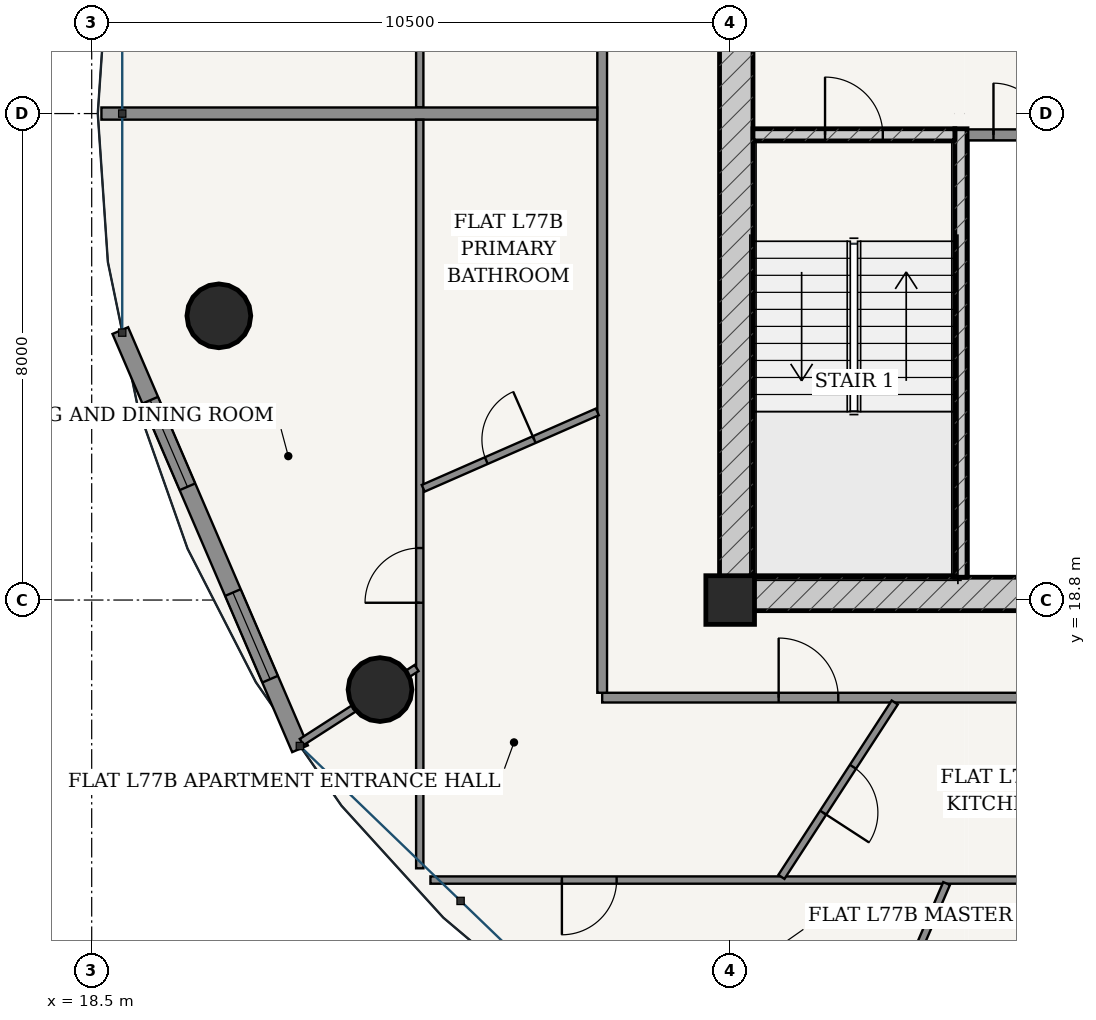
"""IFC4 building model, lengths in metres.
Left out: names, types, materials, properties, quantities, classifications, styles, units other than length and angle.
Written with IfcOpenShell. Run it as: python <this file> out.ifc"""

import sys

from ifc_helpers import new_model, si_unit, direction, frame, frame_2d, origin, origin_2d, place, context, subcontext, project, spatial, rectangle, hollow_circle, extrude, source, transform, mapped, element, fill, save


model = new_model("IFC4")
c1 = context("Model", 3, precision=1e-05, world=origin(), true_north=direction((-0.2419218956, 0.970295726276)))
c2 = subcontext(c1, "Body", "Model", "MODEL_VIEW")
j1 = project(units=[si_unit("LENGTHUNIT", "METRE"), si_unit("PLANEANGLEUNIT", "RADIAN")], contexts=[c1])
p1 = place(None, origin())
s1 = spatial("IfcSite", under=j1, at=p1, CompositionType="ELEMENT")
p2 = place(p1, origin())
s2 = spatial("IfcBuilding", under=s1, at=p2, CompositionType="ELEMENT")
p3 = place(p2, frame((0.0, 0.0, 293.2)))
s3 = spatial("IfcBuildingStorey", under=s2, at=p3, CompositionType="ELEMENT", Elevation=293.2)
p4 = place(p3, frame((29.0, 18.8, 0.0), z_axis=(0.0, 0.0, 1.0), x_axis=(1.0, 0.0, 0.0)))
e1 = element("IfcColumn", 1, at=p4, inside=s3, PredefinedType="COLUMN", context=c2, shape_type="SweptSolid", body=[
    extrude(rectangle(XDim=0.8, YDim=0.8, at=origin_2d()), origin(), (0.0, 0.0, 1.0), 3.75),
])
p5 = place(p3, frame((28.825, 18.9, 0.0), z_axis=(0.0, 0.0, 1.0), x_axis=(1.0, 0.0, 0.0)))
e2 = element("IfcWall", 2, at=p5, inside=s3, PredefinedType="SHEAR", context=c2, shape_type="SweptSolid", body=[
    extrude(rectangle(XDim=18.35, YDim=0.55, at=frame_2d((9.175, 0.0))), origin(), (0.0, 0.0, 1.0), 3.49),
])
p6 = place(p5, frame((8.75, 0.0, 0.0)))
e3 = element("IfcOpeningElement", 3, at=p6, cuts=e2, PredefinedType="OPENING", context=c2, shape_type="SweptSolid", body=[
    extrude(rectangle(XDim=0.85, YDim=2.1, at=frame_2d((0.425, 1.05))), frame((0.0, 0.285, 0.0), z_axis=(0.0, -1.0, 0.0), x_axis=(1.0, 0.0, 0.0)), (0.0, 0.0, 1.0), 0.57),
])
p7 = place(p3, frame((29.1, 19.175, 0.0), z_axis=(0.0, 0.0, 1.0), x_axis=(0.0, 1.0, 0.0)))
e4 = element("IfcWall", 4, at=p7, inside=s3, PredefinedType="SHEAR", context=c2, shape_type="SweptSolid", body=[
    extrude(rectangle(XDim=15.25, YDim=0.55, at=frame_2d((7.625, 0.0))), origin(), (0.0, 0.0, 1.0), 3.49),
])
p8 = place(p7, frame((9.875, 0.0, 0.0)))
e5 = element("IfcOpeningElement", 5, at=p8, cuts=e4, PredefinedType="OPENING", context=c2, shape_type="SweptSolid", body=[
    extrude(rectangle(XDim=1.5, YDim=2.2, at=frame_2d((0.75, 1.1))), frame((0.0, 0.285, 0.0), z_axis=(0.0, -1.0, 0.0), x_axis=(1.0, 0.0, 0.0)), (0.0, 0.0, 1.0), 0.57),
])
p9 = place(p3, frame((32.795, 19.175, 0.0), z_axis=(0.0, 0.0, 1.0), x_axis=(0.0, 1.0, 0.0)))
e6 = element("IfcWall", 6, at=p9, inside=s3, PredefinedType="SOLIDWALL", context=c2, shape_type="SweptSolid", body=[
    extrude(rectangle(XDim=7.375, YDim=0.2, at=frame_2d((3.688, 0.0))), origin(), (0.0, 0.0, 1.0), 3.49),
])
p10 = place(p3, frame((29.375, 26.45, 0.0), z_axis=(0.0, 0.0, 1.0), x_axis=(1.0, 0.0, 0.0)))
e7 = element("IfcWall", 7, at=p10, inside=s3, PredefinedType="SOLIDWALL", context=c2, shape_type="SweptSolid", body=[
    extrude(rectangle(XDim=3.32, YDim=0.2, at=frame_2d((1.66, 0.0))), origin(), (0.0, 0.0, 1.0), 3.49),
])
p11 = place(p10, frame((1.185, 0.0, 0.0)))
e8 = element("IfcOpeningElement", 8, at=p11, cuts=e7, PredefinedType="OPENING", context=c2, shape_type="SweptSolid", body=[
    extrude(rectangle(XDim=0.95, YDim=2.15, at=frame_2d((0.475, 1.075))), frame((0.0, 0.11, 0.0), z_axis=(0.0, -1.0, 0.0), x_axis=(1.0, 0.0, 0.0)), (0.0, 0.0, 1.0), 0.22),
])
for number, where, z_axis, x_axis in (
    (9, (20.591, 23.474, 0.0), (0.0, 0.0, 1.0), (1.0, 0.0, 0.0)),
    (10, (23.241, 17.328, 0.0), (0.0, 0.0, 1.0), (1.0, 0.0, 0.0)),
):
    element("IfcColumn", number, at=place(p3, frame(where, z_axis=z_axis, x_axis=x_axis)), inside=s3, PredefinedType="COLUMN", context=c2, shape_type="SweptSolid", body=[
        extrude(hollow_circle(Radius=0.525, WallThickness=0.035, at=origin_2d()), origin(), (0.0, 0.0, 1.0), 3.75),
    ])
p12 = place(p3, frame((18.971, 23.231, 0.0), z_axis=(0.0, 0.0, 1.0), x_axis=(0.394816612978, -0.918759948037, 0.0)))
e11 = element("IfcWall", 11, at=p12, inside=s3, PredefinedType="SOLIDWALL", context=c2, shape_type="SweptSolid", body=[
    extrude(rectangle(XDim=7.485, YDim=0.28, at=frame_2d((3.743, 0.0))), origin(), (0.0, 0.0, 1.0), 3.49),
])
p13 = place(p12, frame((1.246, 0.0, 0.85)))
e12 = element("IfcOpeningElement", 12, at=p13, cuts=e11, PredefinedType="OPENING", context=c2, shape_type="SweptSolid", body=[
    extrude(rectangle(XDim=1.55, YDim=1.95, at=frame_2d((0.775, 0.975))), frame((0.0, 0.15, 0.0), z_axis=(0.0, -1.0, 0.0), x_axis=(1.0, 0.0, 0.0)), (0.0, 0.0, 1.0), 0.3),
])
p14 = place(p12, frame((4.689, 0.0, 0.85)))
e13 = element("IfcOpeningElement", 13, at=p14, cuts=e11, PredefinedType="OPENING", context=c2, shape_type="SweptSolid", body=[
    extrude(rectangle(XDim=1.55, YDim=1.95, at=frame_2d((0.775, 0.975))), frame((0.0, 0.15, 0.0), z_axis=(0.0, -1.0, 0.0), x_axis=(1.0, 0.0, 0.0)), (0.0, 0.0, 1.0), 0.3),
])
p15 = place(p3, frame((32.9, 26.45, 0.0), z_axis=(0.0, 0.0, 1.0), x_axis=(1.0, 0.0, 0.0)))
e14 = element("IfcWall", 14, at=p15, inside=s3, PredefinedType="PARTITIONING", context=c2, shape_type="SweptSolid", body=[
    extrude(rectangle(XDim=1.71, YDim=0.18, at=frame_2d((0.855, 0.0))), origin(), (0.0, 0.0, 1.0), 3.49),
])
p16 = place(p15, frame((0.43, 0.0, 0.0)))
e15 = element("IfcOpeningElement", 15, at=p16, cuts=e14, PredefinedType="OPENING", context=c2, shape_type="SweptSolid", body=[
    extrude(rectangle(XDim=0.85, YDim=2.1, at=frame_2d((0.425, 1.05))), frame((0.0, 0.1, 0.0), z_axis=(0.0, -1.0, 0.0), x_axis=(1.0, 0.0, 0.0)), (0.0, 0.0, 1.0), 0.2),
])
p17 = place(p3, frame((26.895, 17.195, 0.0), z_axis=(0.0, 0.0, 1.0), x_axis=(1.0, 0.0, 0.0)))
e16 = element("IfcWall", 16, at=p17, inside=s3, PredefinedType="PARTITIONING", context=c2, shape_type="SweptSolid", body=[
    extrude(rectangle(XDim=22.21, YDim=0.16, at=frame_2d((11.105, 0.0))), origin(), (0.0, 0.0, 1.0), 3.015),
])
p18 = place(p17, frame((2.902, 0.0, 0.0)))
e17 = element("IfcOpeningElement", 17, at=p18, cuts=e16, PredefinedType="OPENING", context=c2, shape_type="SweptSolid", body=[
    extrude(rectangle(XDim=0.98, YDim=2.2, at=frame_2d((0.49, 1.1))), frame((0.0, 0.09, 0.0), z_axis=(0.0, -1.0, 0.0), x_axis=(1.0, 0.0, 0.0)), (0.0, 0.0, 1.0), 0.18),
])
p19 = place(p3, frame((26.895, 17.275, 0.0), z_axis=(0.0, 0.0, 1.0), x_axis=(0.0, 1.0, 0.0)))
e18 = element("IfcWall", 18, at=p19, inside=s3, PredefinedType="PARTITIONING", context=c2, shape_type="SweptSolid", body=[
    extrude(rectangle(XDim=13.925, YDim=0.16, at=frame_2d((6.962, 0.0))), origin(), (0.0, 0.0, 1.0), 3.015),
])
p20 = place(p3, frame((23.895, 26.902, 0.0), z_axis=(0.0, 0.0, 1.0), x_axis=(0.0, 1.0, 0.0)))
e19 = element("IfcWall", 19, at=p20, inside=s3, PredefinedType="PARTITIONING", context=c2, shape_type="SweptSolid", body=[
    extrude(rectangle(XDim=7.378, YDim=0.12, at=frame_2d((3.689, 0.0))), origin(), (0.0, 0.0, 1.0), 3.015),
])
p21 = place(p20, frame((3.239, 0.0, 0.0)))
e20 = element("IfcOpeningElement", 20, at=p21, cuts=e19, PredefinedType="OPENING", context=c2, shape_type="SweptSolid", body=[
    extrude(rectangle(XDim=0.9, YDim=2.15, at=frame_2d((0.45, 1.075))), frame((0.0, 0.07, 0.0), z_axis=(0.0, -1.0, 0.0), x_axis=(1.0, 0.0, 0.0)), (0.0, 0.0, 1.0), 0.14),
])
p22 = place(p3, frame((26.815, 26.8, 0.0), z_axis=(0.0, 0.0, 1.0), x_axis=(-1.0, 0.0, 0.0)))
e21 = element("IfcWall", 21, at=p22, inside=s3, PredefinedType="PARTITIONING", context=c2, shape_type="SweptSolid", body=[
    extrude(rectangle(XDim=8.155, YDim=0.2, at=frame_2d((4.078, 0.0))), origin(), (0.0, 0.0, 1.0), 3.121),
])
p23 = place(p3, frame((51.929, 14.195, 0.0), z_axis=(0.0, 0.0, 1.0), x_axis=(-1.0, 0.0, 0.0)))
e22 = element("IfcWall", 22, at=p23, inside=s3, PredefinedType="PARTITIONING", context=c2, shape_type="SweptSolid", body=[
    extrude(rectangle(XDim=27.858, YDim=0.12, at=frame_2d((13.929, 0.0))), origin(), (0.0, 0.0, 1.0), 3.015),
])
p24 = place(p23, frame((24.797, 0.0, 0.0)))
e23 = element("IfcOpeningElement", 23, at=p24, cuts=e22, PredefinedType="OPENING", context=c2, shape_type="SweptSolid", body=[
    extrude(rectangle(XDim=0.9, YDim=2.15, at=frame_2d((0.45, 1.075))), frame((0.0, 0.07, 0.0), z_axis=(0.0, -1.0, 0.0), x_axis=(1.0, 0.0, 0.0)), (0.0, 0.0, 1.0), 0.14),
])
p25 = place(p23, frame((11.968, 0.0, 0.0)))
e24 = element("IfcOpeningElement", 24, at=p25, cuts=e22, PredefinedType="OPENING", context=c2, shape_type="SweptSolid", body=[
    extrude(rectangle(XDim=0.9, YDim=2.15, at=frame_2d((0.45, 1.075))), frame((0.0, 0.07, 0.0), z_axis=(0.0, -1.0, 0.0), x_axis=(1.0, 0.0, 0.0)), (0.0, 0.0, 1.0), 0.14),
])
p26 = place(p23, frame((5.092, 0.0, 0.0)))
e25 = element("IfcOpeningElement", 25, at=p26, cuts=e22, PredefinedType="OPENING", context=c2, shape_type="SweptSolid", body=[
    extrude(rectangle(XDim=0.9, YDim=2.15, at=frame_2d((0.45, 1.075))), frame((0.0, 0.07, 0.0), z_axis=(0.0, -1.0, 0.0), x_axis=(1.0, 0.0, 0.0)), (0.0, 0.0, 1.0), 0.14),
])
p27 = place(p3, frame((23.895, 14.388, 0.0), z_axis=(0.0, 0.0, 1.0), x_axis=(0.0, 1.0, 0.0)))
e26 = element("IfcWall", 26, at=p27, inside=s3, PredefinedType="PARTITIONING", context=c2, shape_type="SweptSolid", body=[
    extrude(rectangle(XDim=12.31, YDim=0.12, at=frame_2d((6.155, 0.0))), origin(), (0.0, 0.0, 1.0), 3.015),
])
p28 = place(p27, frame((4.367, 0.0, 0.0)))
e27 = element("IfcOpeningElement", 27, at=p28, cuts=e26, PredefinedType="OPENING", context=c2, shape_type="SweptSolid", body=[
    extrude(rectangle(XDim=0.9, YDim=2.15, at=frame_2d((0.45, 1.075))), frame((0.0, 0.07, 0.0), z_axis=(0.0, -1.0, 0.0), x_axis=(1.0, 0.0, 0.0)), (0.0, 0.0, 1.0), 0.14),
])
p29 = place(p3, frame((23.843, 17.682, 0.0), z_axis=(0.0, 0.0, 1.0), x_axis=(-0.840690872836, -0.541515333421, 0.0)))
e28 = element("IfcWall", 28, at=p29, inside=s3, PredefinedType="PARTITIONING", context=c2, shape_type="SweptSolid", body=[
    extrude(rectangle(XDim=2.247, YDim=0.12, at=frame_2d((1.123, 0.0))), origin(), (0.0, 0.0, 1.0), 3.015),
])
p30 = place(p3, frame((32.559, 14.138, 0.0), z_axis=(0.0, 0.0, 1.0), x_axis=(-0.394786072864, -0.918773071369, 0.0)))
e29 = element("IfcWall", 29, at=p30, inside=s3, PredefinedType="PARTITIONING", context=c2, shape_type="SweptSolid", body=[
    extrude(rectangle(XDim=4.962, YDim=0.12, at=frame_2d((2.481, 0.0))), origin(), (0.0, 0.0, 1.0), 3.121),
])
p31 = place(p30, frame((2.031, 0.0, 0.0)))
e30 = element("IfcOpeningElement", 30, at=p31, cuts=e29, PredefinedType="OPENING", context=c2, shape_type="SweptSolid", body=[
    extrude(rectangle(XDim=0.9, YDim=2.15, at=frame_2d((0.45, 1.075))), frame((0.0, 0.07, 0.0), z_axis=(0.0, -1.0, 0.0), x_axis=(1.0, 0.0, 0.0)), (0.0, 0.0, 1.0), 0.14),
])
p32 = place(p3, frame((26.815, 21.894, 0.0), z_axis=(0.0, 0.0, 1.0), x_axis=(-0.915755452884, -0.401736170284, 0.0)))
e31 = element("IfcWall", 31, at=p32, inside=s3, PredefinedType="PARTITIONING", context=c2, shape_type="SweptSolid", body=[
    extrude(rectangle(XDim=3.127, YDim=0.12, at=frame_2d((1.563, 0.0))), origin(), (0.0, 0.0, 1.0), 3.209),
])
p33 = place(p32, frame((1.133, 0.0, 0.0)))
e32 = element("IfcOpeningElement", 32, at=p33, cuts=e31, PredefinedType="OPENING", context=c2, shape_type="SweptSolid", body=[
    extrude(rectangle(XDim=0.86, YDim=2.15, at=frame_2d((0.43, 1.075))), frame((0.0, 0.07, 0.0), z_axis=(0.0, -1.0, 0.0), x_axis=(1.0, 0.0, 0.0)), (0.0, 0.0, 1.0), 0.14),
])
p34 = place(p3, frame((31.706, 17.115, 0.0), z_axis=(0.0, 0.0, 1.0), x_axis=(-0.544910571015, -0.838494167896, 0.0)))
e33 = element("IfcWall", 33, at=p34, inside=s3, PredefinedType="PARTITIONING", context=c2, shape_type="SweptSolid", body=[
    extrude(rectangle(XDim=3.42, YDim=0.12, at=frame_2d((1.71, 0.0))), origin(), (0.0, 0.0, 1.0), 3.209),
])
p35 = place(p34, frame((1.26, 0.0, 0.0)))
e34 = element("IfcOpeningElement", 34, at=p35, cuts=e33, PredefinedType="OPENING", context=c2, shape_type="SweptSolid", body=[
    extrude(rectangle(XDim=0.9, YDim=2.15, at=frame_2d((0.45, 1.075))), frame((0.0, 0.07, 0.0), z_axis=(0.0, -1.0, 0.0), x_axis=(1.0, 0.0, 0.0)), (0.0, 0.0, 1.0), 0.14),
])
m1 = source(origin(), c2, "Body", "SweptSolid", [
    extrude(rectangle(XDim=1.55, YDim=1.95, at=frame_2d((0.775, 0.975))), frame((0.0, 0.03, 0.0), z_axis=(0.0, -1.0, 0.0), x_axis=(1.0, 0.0, 0.0)), (0.0, 0.0, 1.0), 0.06),
])
p36 = place(p13, origin())
e35 = element("IfcWindow", 35, at=p36, inside=s3, PartitioningType="SINGLE_PANEL", PredefinedType="WINDOW", context=c2, shape_type="MappedRepresentation", body=[
    mapped(m1, transform((0.0, 0.0, 0.0), scale=1.0)),
])
fill(e12, e35)
p37 = place(p14, origin())
e36 = element("IfcWindow", 36, at=p37, inside=s3, PartitioningType="SINGLE_PANEL", PredefinedType="WINDOW", context=c2, shape_type="MappedRepresentation", body=[
    mapped(m1, transform((0.0, 0.0, 0.0), scale=1.0)),
])
fill(e13, e36)
m2 = source(origin(), c2, "Body", "SweptSolid", [
    extrude(rectangle(XDim=0.95, YDim=2.15, at=frame_2d((0.475, 1.075))), frame((0.0, 0.025, 0.0), z_axis=(0.0, -1.0, 0.0), x_axis=(1.0, 0.0, 0.0)), (0.0, 0.0, 1.0), 0.05),
])
p38 = place(p11, origin())
e37 = element("IfcDoor", 37, at=p38, inside=s3, OperationType="SINGLE_SWING_LEFT", PredefinedType="DOOR", context=c2, shape_type="MappedRepresentation", body=[
    mapped(m2, transform((0.0, 0.0, 0.0), scale=1.0)),
])
fill(e8, e37)
m3 = source(origin(), c2, "Body", "SweptSolid", [
    extrude(rectangle(XDim=0.85, YDim=2.1, at=frame_2d((0.425, 1.05))), frame((0.0, 0.025, 0.0), z_axis=(0.0, -1.0, 0.0), x_axis=(1.0, 0.0, 0.0)), (0.0, 0.0, 1.0), 0.05),
])
p39 = place(p16, origin())
e38 = element("IfcDoor", 38, at=p39, inside=s3, OperationType="SINGLE_SWING_LEFT", PredefinedType="DOOR", context=c2, shape_type="MappedRepresentation", body=[
    mapped(m3, transform((0.0, 0.0, 0.0), scale=1.0)),
])
fill(e15, e38)
m4 = source(origin(), c2, "Body", "SweptSolid", [
    extrude(rectangle(XDim=0.98, YDim=2.2, at=frame_2d((0.49, 1.1))), frame((0.0, 0.025, 0.0), z_axis=(0.0, -1.0, 0.0), x_axis=(1.0, 0.0, 0.0)), (0.0, 0.0, 1.0), 0.05),
])
p40 = place(p18, origin())
e39 = element("IfcDoor", 39, at=p40, inside=s3, OperationType="SINGLE_SWING_LEFT", PredefinedType="DOOR", context=c2, shape_type="MappedRepresentation", body=[
    mapped(m4, transform((0.0, 0.0, 0.0), scale=1.0)),
])
fill(e17, e39)
m5 = source(origin(), c2, "Body", "SweptSolid", [
    extrude(rectangle(XDim=0.86, YDim=2.15, at=frame_2d((0.43, 1.075))), frame((0.0, 0.025, 0.0), z_axis=(0.0, -1.0, 0.0), x_axis=(1.0, 0.0, 0.0)), (0.0, 0.0, 1.0), 0.05),
])
p41 = place(p33, frame((0.86, 0.0, 0.0), z_axis=(0.0, 0.0, 1.0), x_axis=(-1.0, 0.0, 0.0)))
e40 = element("IfcDoor", 40, at=p41, inside=s3, OperationType="SINGLE_SWING_RIGHT", PredefinedType="DOOR", context=c2, shape_type="MappedRepresentation", body=[
    mapped(m5, transform((0.0, 0.0, 0.0), scale=1.0)),
])
fill(e32, e40)
m6 = source(origin(), c2, "Body", "SweptSolid", [
    extrude(rectangle(XDim=0.9, YDim=2.15, at=frame_2d((0.45, 1.075))), frame((0.0, 0.025, 0.0), z_axis=(0.0, -1.0, 0.0), x_axis=(1.0, 0.0, 0.0)), (0.0, 0.0, 1.0), 0.05),
])
p42 = place(p28, origin())
e41 = element("IfcDoor", 41, at=p42, inside=s3, OperationType="SINGLE_SWING_LEFT", PredefinedType="DOOR", context=c2, shape_type="MappedRepresentation", body=[
    mapped(m6, transform((0.0, 0.0, 0.0), scale=1.0)),
])
fill(e27, e41)
p43 = place(p35, origin())
e42 = element("IfcDoor", 42, at=p43, inside=s3, OperationType="SINGLE_SWING_RIGHT", PredefinedType="DOOR", context=c2, shape_type="MappedRepresentation", body=[
    mapped(m6, transform((0.0, 0.0, 0.0), scale=1.0)),
])
fill(e34, e42)
p44 = place(p24, origin())
e43 = element("IfcDoor", 43, at=p44, inside=s3, OperationType="SINGLE_SWING_RIGHT", PredefinedType="DOOR", context=c2, shape_type="MappedRepresentation", body=[
    mapped(m6, transform((0.0, 0.0, 0.0), scale=1.0)),
])
fill(e23, e43)
save(model, sys.argv[1])
